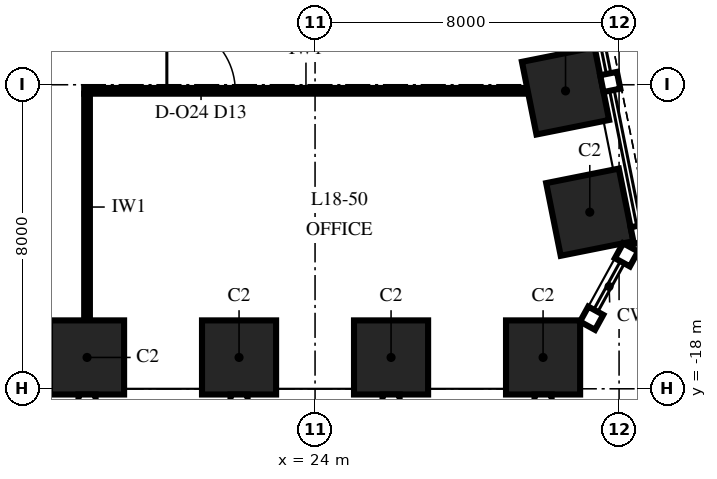
"""IFC4 building model, lengths in metres.
Left out: names, types, materials, properties, quantities, classifications, styles, units other than length and angle.
Written with IfcOpenShell. Run it as: python <this file> out.ifc"""

import sys

from ifc_helpers import new_model, si_unit, direction, frame, frame_2d, origin, origin_2d, place, context, subcontext, project, spatial, rectangle, extrude, element, fill, save


model = new_model("IFC4")
c1 = context("Model", 3, precision=1e-05, world=origin(), true_north=direction((0.0, 1.0)))
c2 = subcontext(c1, "Body", "Model", "MODEL_VIEW")
j1 = project(units=[si_unit("LENGTHUNIT", "METRE"), si_unit("PLANEANGLEUNIT", "RADIAN")], contexts=[c1])
p1 = place(None, origin())
s1 = spatial("IfcSite", under=j1, at=p1, CompositionType="ELEMENT")
p2 = place(p1, origin())
s2 = spatial("IfcBuilding", under=s1, at=p2, CompositionType="ELEMENT")
p3 = place(p2, frame((0.0, 0.0, 84.0)))
s3 = spatial("IfcBuildingStorey", under=s2, at=p3, CompositionType="ELEMENT", Elevation=84.0)
for number, where, z_axis, x_axis in (
    (1, (18.0, -17.175, 0.0), (0.0, 0.0, 1.0), (1.0, 0.0, 0.0)),
    (2, (22.0, -17.175, 0.0), (0.0, 0.0, 1.0), (1.0, 0.0, 0.0)),
    (3, (26.0, -17.175, 0.0), (0.0, 0.0, 1.0), (1.0, 0.0, 0.0)),
    (4, (30.0, -17.175, 0.0), (0.0, 0.0, 1.0), (1.0, 0.0, 0.0)),
    (5, (31.229, -13.353, 0.0), (0.0, 0.0, 1.0), (-0.196, 0.981, 0.0)),
    (6, (30.591, -10.162, 0.0), (0.0, 0.0, 1.0), (-0.196, 0.981, 0.0)),
):
    element("IfcColumn", number, at=place(p3, frame(where, z_axis=z_axis, x_axis=x_axis)), inside=s3, PredefinedType="COLUMN", context=c2, shape_type="SweptSolid", body=[
        extrude(rectangle(XDim=1.95, YDim=1.95, at=origin_2d()), origin(), (0.0, 0.0, 1.0), 4.0),
    ])
p4 = place(p3, frame((17.925, -10.16, 0.0), z_axis=(0.0, 0.0, 1.0), x_axis=(1.0, 0.0, 0.0)))
e7 = element("IfcWall", 7, at=p4, inside=s3, PredefinedType="PARTITIONING", context=c2, shape_type="SweptSolid", body=[
    extrude(rectangle(XDim=11.671, YDim=0.15, at=frame_2d((5.836, 0.0))), origin(), (0.0, 0.0, 1.0), 3.25),
])
p5 = place(p4, frame((2.175, 0.0, 0.0)))
e8 = element("IfcOpeningElement", 8, at=p5, cuts=e7, PredefinedType="OPENING", context=c2, shape_type="SweptSolid", body=[
    extrude(rectangle(XDim=1.8, YDim=2.4, at=frame_2d((0.9, 1.2))), frame((0.0, 0.09, 0.0), z_axis=(0.0, -1.0, 0.0), x_axis=(1.0, 0.0, 0.0)), (0.0, 0.0, 1.0), 0.18),
])
p6 = place(p3, frame((18.0, -16.2, 0.0), z_axis=(0.0, 0.0, 1.0), x_axis=(0.0, 1.0, 0.0)))
e9 = element("IfcWall", 9, at=p6, inside=s3, PredefinedType="PARTITIONING", context=c2, shape_type="SweptSolid", body=[
    extrude(rectangle(XDim=5.965, YDim=0.15, at=frame_2d((2.982, 0.0))), origin(), (0.0, 0.0, 1.0), 3.25),
])
p7 = place(p5, origin())
e10 = element("IfcDoor", 10, at=p7, inside=s3, OperationType="DOUBLE_DOOR_SINGLE_SWING", PredefinedType="DOOR", context=c2, shape_type="SweptSolid", body=[
    extrude(rectangle(XDim=1.8, YDim=2.4, at=frame_2d((0.9, 1.2))), frame((0.0, 0.075, 0.0), z_axis=(0.0, -1.0, 0.0), x_axis=(1.0, 0.0, 0.0)), (0.0, 0.0, 1.0), 0.149),
])
fill(e8, e10)
save(model, sys.argv[1])
